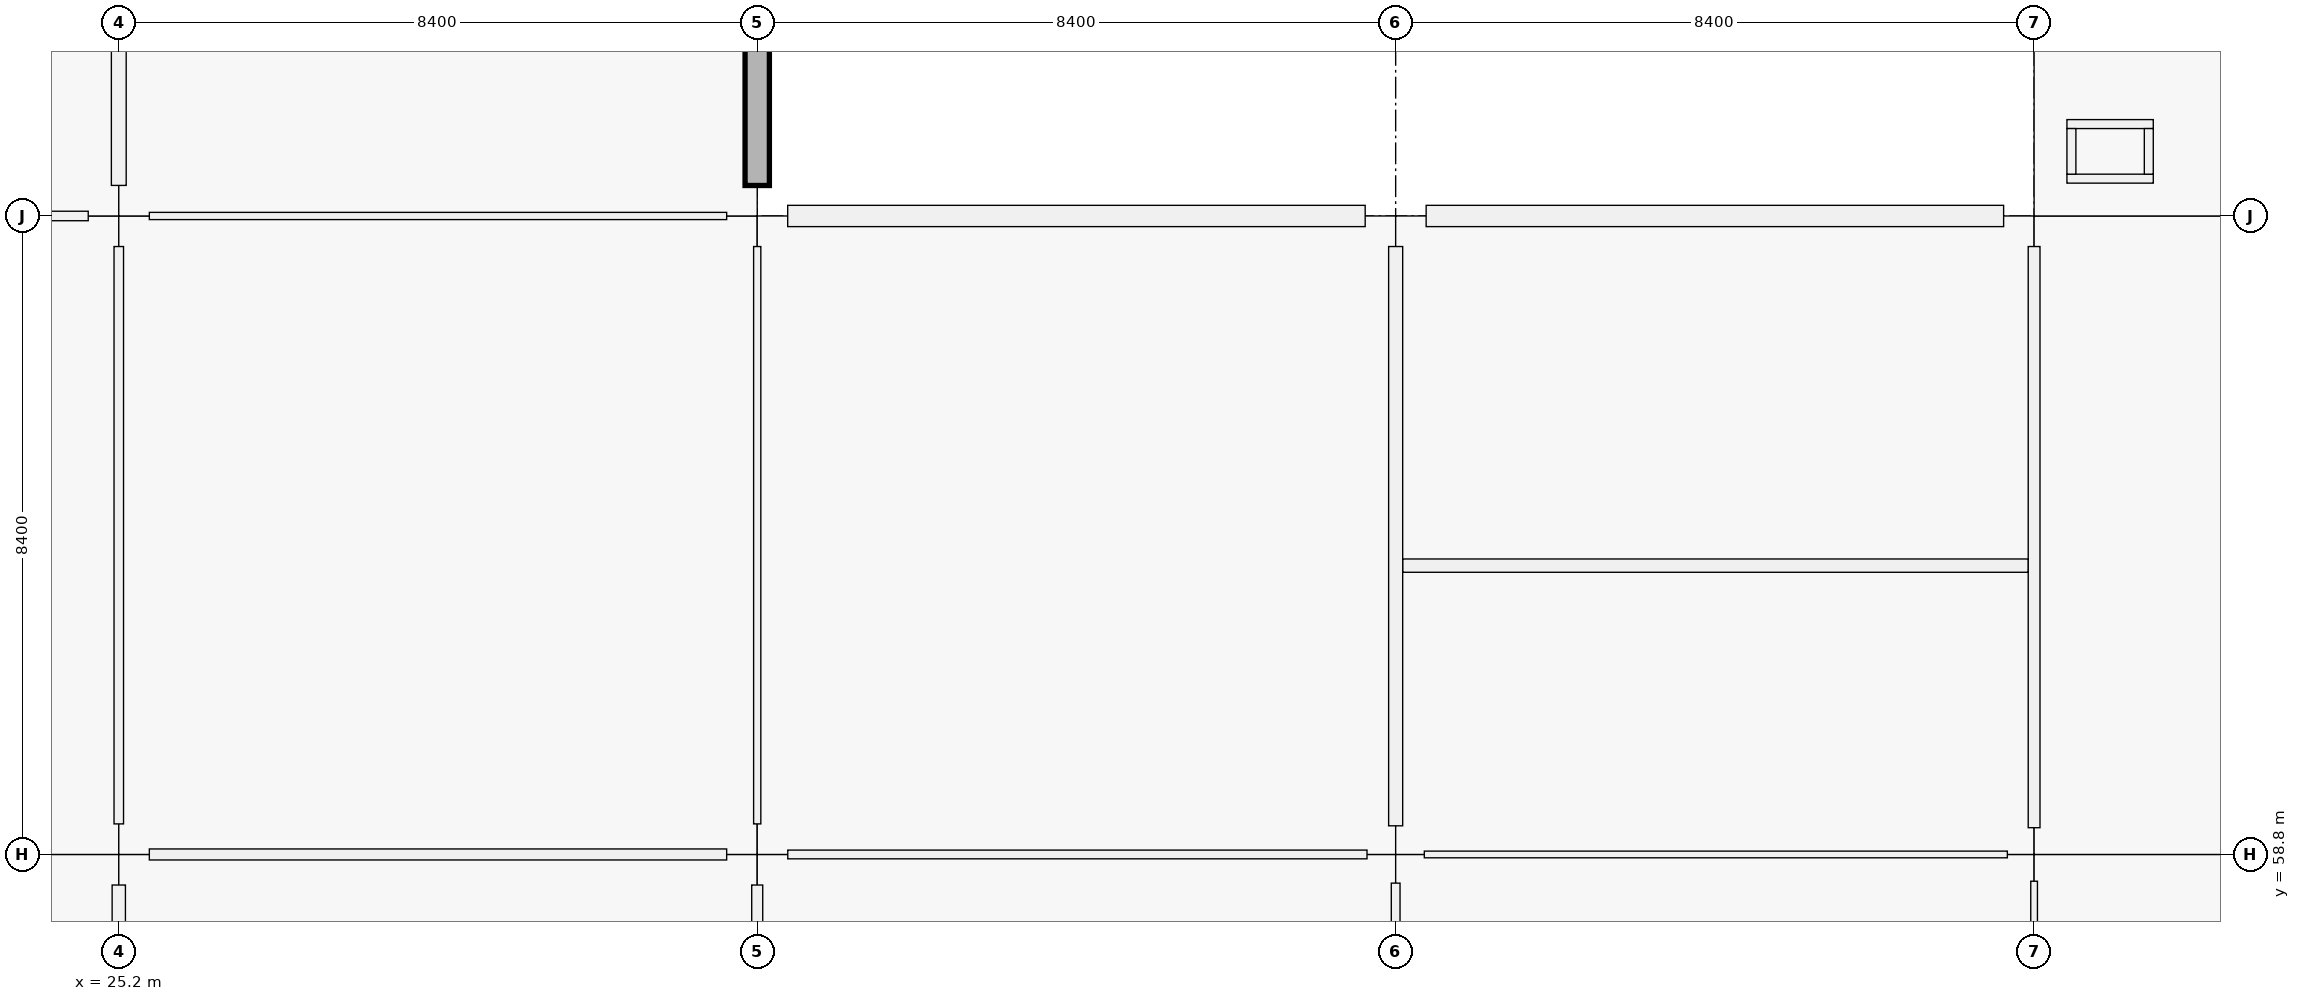
"""IFC4 building model, lengths in metres.
Left out: names, types, materials, properties, quantities, classifications, styles, units other than length and angle.
Written with IfcOpenShell. Run it as: python <this file> out.ifc"""

import sys

from ifc_helpers import new_model, si_unit, direction, frame, frame_2d, origin, origin_2d, place, context, subcontext, project, spatial, rectangle, extrude, element, fill, save


model = new_model("IFC4")
c1 = context("Model", 3, precision=1e-05, world=origin(), true_north=direction((0.0, 1.0)))
c2 = subcontext(c1, "Body", "Model", "MODEL_VIEW")
j1 = project(units=[si_unit("LENGTHUNIT", "METRE"), si_unit("PLANEANGLEUNIT", "RADIAN")], contexts=[c1])
p1 = place(None, origin())
s1 = spatial("IfcSite", under=j1, at=p1, CompositionType="ELEMENT")
p2 = place(p1, origin())
s2 = spatial("IfcBuilding", under=s1, at=p2, CompositionType="ELEMENT")
p3 = place(p2, frame((0.0, 0.0, 5.76)))
s3 = spatial("IfcBuildingStorey", under=s2, at=p3, CompositionType="ELEMENT", Elevation=5.76)
for number, where, z_axis, x_axis in (
    (1, (25.2, 58.8, 0.0), (0.0, 0.0, 1.0), (1.0, 0.0, 0.0)),
    (2, (25.2, 67.2, 0.0), (0.0, 0.0, 1.0), (1.0, 0.0, 0.0)),
    (3, (33.6, 58.8, 0.0), (0.0, 0.0, 1.0), (1.0, 0.0, 0.0)),
    (4, (33.6, 67.2, 0.0), (0.0, 0.0, 1.0), (1.0, 0.0, 0.0)),
):
    element("IfcColumn", number, at=place(p3, frame(where, z_axis=z_axis, x_axis=x_axis)), inside=s3, PredefinedType="COLUMN", context=c2, shape_type="SweptSolid", body=[
        extrude(rectangle(XDim=0.8, YDim=0.8, at=origin_2d()), origin(), (0.0, 0.0, 1.0), 4.5),
    ])
p4 = place(p3, frame((42.0, 58.8, 0.0), z_axis=(0.0, 0.0, 1.0), x_axis=(1.0, 0.0, 0.0)))
e5 = element("IfcColumn", 5, at=p4, inside=s3, PredefinedType="COLUMN", context=c2, shape_type="SweptSolid", body=[
    extrude(rectangle(XDim=0.75, YDim=0.75, at=origin_2d()), origin(), (0.0, 0.0, 1.0), 4.5),
])
p5 = place(p3, frame((42.0, 67.2, 0.0), z_axis=(0.0, 0.0, 1.0), x_axis=(1.0, 0.0, 0.0)))
e6 = element("IfcColumn", 6, at=p5, inside=s3, PredefinedType="COLUMN", context=c2, shape_type="SweptSolid", body=[
    extrude(rectangle(XDim=0.8, YDim=0.8, at=origin_2d()), origin(), (0.0, 0.0, 1.0), 4.5),
])
p6 = place(p3, frame((50.4, 58.8, 0.0), z_axis=(0.0, 0.0, 1.0), x_axis=(1.0, 0.0, 0.0)))
e7 = element("IfcColumn", 7, at=p6, inside=s3, PredefinedType="COLUMN", context=c2, shape_type="SweptSolid", body=[
    extrude(rectangle(XDim=0.7, YDim=0.7, at=origin_2d()), origin(), (0.0, 0.0, 1.0), 4.5),
])
p7 = place(p3, frame((50.4, 67.2, 0.0), z_axis=(0.0, 0.0, 1.0), x_axis=(1.0, 0.0, 0.0)))
e8 = element("IfcColumn", 8, at=p7, inside=s3, PredefinedType="COLUMN", context=c2, shape_type="SweptSolid", body=[
    extrude(rectangle(XDim=0.8, YDim=0.8, at=origin_2d()), origin(), (0.0, 0.0, 1.0), 4.5),
])
p8 = place(p3, frame((33.6, 75.199, 0.0), z_axis=(0.0, 0.0, 1.0), x_axis=(0.0, -1.0, 0.0)))
e9 = element("IfcWall", 9, at=p8, inside=s3, PredefinedType="SOLIDWALL", context=c2, shape_type="SweptSolid", body=[
    extrude(rectangle(XDim=7.598, YDim=0.32, at=frame_2d((3.799, 0.0))), origin(), (0.0, 0.0, 1.0), 3.4),
])
p9 = place(p8, frame((2.524, 0.0, 0.9)))
e10 = element("IfcOpeningElement", 10, at=p9, cuts=e9, PredefinedType="OPENING", context=c2, shape_type="SweptSolid", body=[
    extrude(rectangle(XDim=2.55, YDim=1.95, at=frame_2d((1.275, 0.975))), frame((0.0, 0.16, 0.0), z_axis=(0.0, -1.0, 0.0), x_axis=(1.0, 0.0, 0.0)), (0.0, 0.0, 1.0), 0.32),
])
p10 = place(p3, frame((34.001, 67.2, 0.0), z_axis=(0.0, 0.0, 1.0), x_axis=(1.0, 0.0, 0.0)))
e11 = element("IfcWall", 11, at=p10, inside=s3, PredefinedType="SOLIDWALL", context=c2, shape_type="SweptSolid", body=[
    extrude(rectangle(XDim=7.598, YDim=0.28, at=frame_2d((3.799, 0.0))), origin(), (0.0, 0.0, 1.0), 3.4),
])
p11 = place(p10, frame((3.149, 0.0, 0.9)))
e12 = element("IfcOpeningElement", 12, at=p11, cuts=e11, PredefinedType="OPENING", context=c2, shape_type="SweptSolid", body=[
    extrude(rectangle(XDim=1.3, YDim=1.95, at=frame_2d((0.65, 0.975))), frame((0.0, 0.14, 0.0), z_axis=(0.0, -1.0, 0.0), x_axis=(1.0, 0.0, 0.0)), (0.0, 0.0, 1.0), 0.28),
])
p12 = place(p3, frame((42.401, 67.2, 0.0), z_axis=(0.0, 0.0, 1.0), x_axis=(1.0, 0.0, 0.0)))
e13 = element("IfcWall", 13, at=p12, inside=s3, PredefinedType="SOLIDWALL", context=c2, shape_type="SweptSolid", body=[
    extrude(rectangle(XDim=7.598, YDim=0.28, at=frame_2d((3.799, 0.0))), origin(), (0.0, 0.0, 1.0), 3.4),
])
p13 = place(p12, frame((3.024, 0.0, 0.9)))
e14 = element("IfcOpeningElement", 14, at=p13, cuts=e13, PredefinedType="OPENING", context=c2, shape_type="SweptSolid", body=[
    extrude(rectangle(XDim=1.55, YDim=1.6, at=frame_2d((0.775, 0.8))), frame((0.0, 0.14, 0.0), z_axis=(0.0, -1.0, 0.0), x_axis=(1.0, 0.0, 0.0)), (0.0, 0.0, 1.0), 0.28),
])
for number, where, z_axis, x_axis in (
    (15, (50.832, 67.691, 0.0), (0.0, 0.0, 1.0), (1.0, 0.0, 0.0)),
    (16, (50.832, 68.409, 0.0), (0.0, 0.0, 1.0), (1.0, 0.0, 0.0)),
):
    element("IfcWall", number, at=place(p3, frame(where, z_axis=z_axis, x_axis=x_axis)), inside=s3, PredefinedType="PARTITIONING", context=c2, shape_type="SweptSolid", body=[
        extrude(rectangle(XDim=1.136, YDim=0.118, at=frame_2d((0.568, 0.0))), origin(), (0.0, 0.0, 1.0), 3.48),
    ])
for number, where, z_axis, x_axis in (
    (17, (50.891, 67.75, 0.0), (0.0, 0.0, 1.0), (0.0, 1.0, 0.0)),
    (18, (51.909, 67.75, 0.0), (0.0, 0.0, 1.0), (0.0, 1.0, 0.0)),
):
    element("IfcWall", number, at=place(p3, frame(where, z_axis=z_axis, x_axis=x_axis)), inside=s3, PredefinedType="PARTITIONING", context=c2, shape_type="SweptSolid", body=[
        extrude(rectangle(XDim=0.6, YDim=0.118, at=frame_2d((0.3, 0.0))), origin(), (0.0, 0.0, 1.0), 3.48),
    ])
p14 = place(p3, frame((17.202, 67.2, 0.0), z_axis=(0.0, 0.0, 1.0), x_axis=(1.0, 0.0, 0.0)))
e19 = element("IfcWall", 19, at=p14, inside=s3, PredefinedType="PARTITIONING", context=c2, shape_type="SweptSolid", body=[
    extrude(rectangle(XDim=7.596, YDim=0.125, at=frame_2d((3.798, 0.0))), origin(), (0.0, 0.0, 1.0), 2.4),
])
p15 = place(p14, frame((3.273, 0.0, 0.0)))
e20 = element("IfcOpeningElement", 20, at=p15, cuts=e19, PredefinedType="OPENING", context=c2, shape_type="SweptSolid", body=[
    extrude(rectangle(XDim=1.05, YDim=2.12, at=frame_2d((0.525, 1.06))), frame((0.0, 0.062, 0.0), z_axis=(0.0, -1.0, 0.0), x_axis=(1.0, 0.0, 0.0)), (0.0, 0.0, 1.0), 0.125),
])
p16 = place(p3, frame((25.602, 58.8, 0.0), z_axis=(0.0, 0.0, 1.0), x_axis=(1.0, 0.0, 0.0)))
e21 = element("IfcWall", 21, at=p16, inside=s3, PredefinedType="PARTITIONING", context=c2, shape_type="SweptSolid", body=[
    extrude(rectangle(XDim=7.596, YDim=0.145, at=frame_2d((3.798, 0.0))), origin(), (0.0, 0.0, 1.0), 2.4),
])
p17 = place(p16, frame((3.268, 0.0, 0.0)))
e22 = element("IfcOpeningElement", 22, at=p17, cuts=e21, PredefinedType="OPENING", context=c2, shape_type="SweptSolid", body=[
    extrude(rectangle(XDim=1.06, YDim=2.22, at=frame_2d((0.53, 1.11))), frame((0.0, 0.073, 0.0), z_axis=(0.0, -1.0, 0.0), x_axis=(1.0, 0.0, 0.0)), (0.0, 0.0, 1.0), 0.145),
])
p18 = place(p3, frame((25.602, 67.2, 0.0), z_axis=(0.0, 0.0, 1.0), x_axis=(1.0, 0.0, 0.0)))
e23 = element("IfcWall", 23, at=p18, inside=s3, PredefinedType="PARTITIONING", context=c2, shape_type="SweptSolid", body=[
    extrude(rectangle(XDim=7.596, YDim=0.095, at=frame_2d((3.798, 0.0))), origin(), (0.0, 0.0, 1.0), 2.4),
])
p19 = place(p18, frame((3.258, 0.0, 0.0)))
e24 = element("IfcOpeningElement", 24, at=p19, cuts=e23, PredefinedType="OPENING", context=c2, shape_type="SweptSolid", body=[
    extrude(rectangle(XDim=1.08, YDim=2.22, at=frame_2d((0.54, 1.11))), frame((0.0, 0.047, 0.0), z_axis=(0.0, -1.0, 0.0), x_axis=(1.0, 0.0, 0.0)), (0.0, 0.0, 1.0), 0.095),
])
p20 = place(p3, frame((34.002, 58.8, 0.0), z_axis=(0.0, 0.0, 1.0), x_axis=(1.0, 0.0, 0.0)))
e25 = element("IfcWall", 25, at=p20, inside=s3, PredefinedType="PARTITIONING", context=c2, shape_type="SweptSolid", body=[
    extrude(rectangle(XDim=7.621, YDim=0.115, at=frame_2d((3.811, 0.0))), origin(), (0.0, 0.0, 1.0), 2.4),
])
p21 = place(p20, frame((3.28, 0.0, 0.0)))
e26 = element("IfcOpeningElement", 26, at=p21, cuts=e25, PredefinedType="OPENING", context=c2, shape_type="SweptSolid", body=[
    extrude(rectangle(XDim=1.06, YDim=2.22, at=frame_2d((0.53, 1.11))), frame((0.0, 0.058, 0.0), z_axis=(0.0, -1.0, 0.0), x_axis=(1.0, 0.0, 0.0)), (0.0, 0.0, 1.0), 0.115),
])
p22 = place(p3, frame((42.377, 58.8, 0.0), z_axis=(0.0, 0.0, 1.0), x_axis=(1.0, 0.0, 0.0)))
e27 = element("IfcWall", 27, at=p22, inside=s3, PredefinedType="PARTITIONING", context=c2, shape_type="SweptSolid", body=[
    extrude(rectangle(XDim=7.671, YDim=0.088, at=frame_2d((3.835, 0.0))), origin(), (0.0, 0.0, 1.0), 2.4),
])
p23 = place(p3, frame((25.2, 50.802, 0.0), z_axis=(0.0, 0.0, 1.0), x_axis=(0.0, 1.0, 0.0)))
e28 = element("IfcWall", 28, at=p23, inside=s3, PredefinedType="PARTITIONING", context=c2, shape_type="SweptSolid", body=[
    extrude(rectangle(XDim=7.596, YDim=0.175, at=frame_2d((3.798, 0.0))), origin(), (0.0, 0.0, 1.0), 2.4),
])
p24 = place(p23, frame((3.288, 0.0, 0.0)))
e29 = element("IfcOpeningElement", 29, at=p24, cuts=e28, PredefinedType="OPENING", context=c2, shape_type="SweptSolid", body=[
    extrude(rectangle(XDim=1.02, YDim=2.2, at=frame_2d((0.51, 1.1))), frame((0.0, 0.087, 0.0), z_axis=(0.0, -1.0, 0.0), x_axis=(1.0, 0.0, 0.0)), (0.0, 0.0, 1.0), 0.175),
])
p25 = place(p3, frame((25.2, 59.202, 0.0), z_axis=(0.0, 0.0, 1.0), x_axis=(0.0, 1.0, 0.0)))
e30 = element("IfcWall", 30, at=p25, inside=s3, PredefinedType="PARTITIONING", context=c2, shape_type="SweptSolid", body=[
    extrude(rectangle(XDim=7.596, YDim=0.125, at=frame_2d((3.798, 0.0))), origin(), (0.0, 0.0, 1.0), 2.4),
])
p26 = place(p25, frame((3.298, 0.0, 0.0)))
e31 = element("IfcOpeningElement", 31, at=p26, cuts=e30, PredefinedType="OPENING", context=c2, shape_type="SweptSolid", body=[
    extrude(rectangle(XDim=1.0, YDim=2.2, at=frame_2d((0.5, 1.1))), frame((0.0, 0.062, 0.0), z_axis=(0.0, -1.0, 0.0), x_axis=(1.0, 0.0, 0.0)), (0.0, 0.0, 1.0), 0.125),
])
p27 = place(p3, frame((25.2, 67.602, 0.0), z_axis=(0.0, 0.0, 1.0), x_axis=(0.0, 1.0, 0.0)))
e32 = element("IfcWall", 32, at=p27, inside=s3, PredefinedType="PARTITIONING", context=c2, shape_type="SweptSolid", body=[
    extrude(rectangle(XDim=7.596, YDim=0.195, at=frame_2d((3.798, 0.0))), origin(), (0.0, 0.0, 1.0), 2.4),
])
p28 = place(p27, frame((3.288, 0.0, 0.0)))
e33 = element("IfcOpeningElement", 33, at=p28, cuts=e32, PredefinedType="OPENING", context=c2, shape_type="SweptSolid", body=[
    extrude(rectangle(XDim=1.02, YDim=2.2, at=frame_2d((0.51, 1.1))), frame((0.0, 0.098, 0.0), z_axis=(0.0, -1.0, 0.0), x_axis=(1.0, 0.0, 0.0)), (0.0, 0.0, 1.0), 0.195),
])
p29 = place(p3, frame((33.6, 50.802, 0.0), z_axis=(0.0, 0.0, 1.0), x_axis=(0.0, 1.0, 0.0)))
e34 = element("IfcWall", 34, at=p29, inside=s3, PredefinedType="PARTITIONING", context=c2, shape_type="SweptSolid", body=[
    extrude(rectangle(XDim=7.596, YDim=0.145, at=frame_2d((3.798, 0.0))), origin(), (0.0, 0.0, 1.0), 2.4),
])
p30 = place(p29, frame((3.318, 0.0, 0.0)))
e35 = element("IfcOpeningElement", 35, at=p30, cuts=e34, PredefinedType="OPENING", context=c2, shape_type="SweptSolid", body=[
    extrude(rectangle(XDim=0.96, YDim=2.18, at=frame_2d((0.48, 1.09))), frame((0.0, 0.073, 0.0), z_axis=(0.0, -1.0, 0.0), x_axis=(1.0, 0.0, 0.0)), (0.0, 0.0, 1.0), 0.145),
])
p31 = place(p3, frame((33.6, 59.202, 0.0), z_axis=(0.0, 0.0, 1.0), x_axis=(0.0, 1.0, 0.0)))
e36 = element("IfcWall", 36, at=p31, inside=s3, PredefinedType="PARTITIONING", context=c2, shape_type="SweptSolid", body=[
    extrude(rectangle(XDim=7.596, YDim=0.095, at=frame_2d((3.798, 0.0))), origin(), (0.0, 0.0, 1.0), 2.4),
])
p32 = place(p31, frame((3.308, 0.0, 0.0)))
e37 = element("IfcOpeningElement", 37, at=p32, cuts=e36, PredefinedType="OPENING", context=c2, shape_type="SweptSolid", body=[
    extrude(rectangle(XDim=0.98, YDim=2.18, at=frame_2d((0.49, 1.09))), frame((0.0, 0.047, 0.0), z_axis=(0.0, -1.0, 0.0), x_axis=(1.0, 0.0, 0.0)), (0.0, 0.0, 1.0), 0.095),
])
p33 = place(p3, frame((42.0, 50.752, 0.0), z_axis=(0.0, 0.0, 1.0), x_axis=(0.0, 1.0, 0.0)))
e38 = element("IfcWall", 38, at=p33, inside=s3, PredefinedType="PARTITIONING", context=c2, shape_type="SweptSolid", body=[
    extrude(rectangle(XDim=7.671, YDim=0.115, at=frame_2d((3.835, 0.0))), origin(), (0.0, 0.0, 1.0), 2.4),
])
p34 = place(p3, frame((42.0, 59.177, 0.0), z_axis=(0.0, 0.0, 1.0), x_axis=(0.0, 1.0, 0.0)))
e39 = element("IfcWall", 39, at=p34, inside=s3, PredefinedType="PARTITIONING", context=c2, shape_type="SweptSolid", body=[
    extrude(rectangle(XDim=7.621, YDim=0.185, at=frame_2d((3.811, 0.0))), origin(), (0.0, 0.0, 1.0), 2.4),
])
p35 = place(p3, frame((50.4, 50.777, 0.0), z_axis=(0.0, 0.0, 1.0), x_axis=(0.0, 1.0, 0.0)))
e40 = element("IfcWall", 40, at=p35, inside=s3, PredefinedType="PARTITIONING", context=c2, shape_type="SweptSolid", body=[
    extrude(rectangle(XDim=7.671, YDim=0.088, at=frame_2d((3.835, 0.0))), origin(), (0.0, 0.0, 1.0), 2.4),
])
p36 = place(p35, frame((1.193, 0.0, 0.0)))
e41 = element("IfcOpeningElement", 41, at=p36, cuts=e40, PredefinedType="OPENING", context=c2, shape_type="SweptSolid", body=[
    extrude(rectangle(XDim=0.94, YDim=2.15, at=frame_2d((0.47, 1.075))), frame((0.0, 0.044, 0.0), z_axis=(0.0, -1.0, 0.0), x_axis=(1.0, 0.0, 0.0)), (0.0, 0.0, 1.0), 0.088),
])
p37 = place(p35, frame((5.123, 0.0, 0.0)))
e42 = element("IfcOpeningElement", 42, at=p37, cuts=e40, PredefinedType="OPENING", context=c2, shape_type="SweptSolid", body=[
    extrude(rectangle(XDim=0.92, YDim=2.15, at=frame_2d((0.46, 1.075))), frame((0.0, 0.044, 0.0), z_axis=(0.0, -1.0, 0.0), x_axis=(1.0, 0.0, 0.0)), (0.0, 0.0, 1.0), 0.088),
])
p38 = place(p3, frame((50.4, 59.152, 0.0), z_axis=(0.0, 0.0, 1.0), x_axis=(0.0, 1.0, 0.0)))
e43 = element("IfcWall", 43, at=p38, inside=s3, PredefinedType="PARTITIONING", context=c2, shape_type="SweptSolid", body=[
    extrude(rectangle(XDim=7.646, YDim=0.155, at=frame_2d((3.823, 0.0))), origin(), (0.0, 0.0, 1.0), 2.4),
])
p39 = place(p38, frame((1.163, 0.0, 0.0)))
e44 = element("IfcOpeningElement", 44, at=p39, cuts=e43, PredefinedType="OPENING", context=c2, shape_type="SweptSolid", body=[
    extrude(rectangle(XDim=1.05, YDim=2.12, at=frame_2d((0.525, 1.06))), frame((0.0, 0.078, 0.0), z_axis=(0.0, -1.0, 0.0), x_axis=(1.0, 0.0, 0.0)), (0.0, 0.0, 1.0), 0.155),
])
p40 = place(p38, frame((5.103, 0.0, 0.0)))
e45 = element("IfcOpeningElement", 45, at=p40, cuts=e43, PredefinedType="OPENING", context=c2, shape_type="SweptSolid", body=[
    extrude(rectangle(XDim=1.01, YDim=2.12, at=frame_2d((0.505, 1.06))), frame((0.0, 0.078, 0.0), z_axis=(0.0, -1.0, 0.0), x_axis=(1.0, 0.0, 0.0)), (0.0, 0.0, 1.0), 0.155),
])
p41 = place(p3, frame((42.094, 62.6, 0.0), z_axis=(0.0, 0.0, 1.0), x_axis=(1.0, 0.0, 0.0)))
e46 = element("IfcWall", 46, at=p41, inside=s3, PredefinedType="PARTITIONING", context=c2, shape_type="SweptSolid", body=[
    extrude(rectangle(XDim=8.226, YDim=0.175, at=frame_2d((4.113, 0.0))), origin(), (0.0, 0.0, 1.0), 2.4),
])
p42 = place(p11, origin())
e47 = element("IfcWindow", 47, at=p42, inside=s3, PartitioningType="SINGLE_PANEL", PredefinedType="WINDOW", context=c2, shape_type="SweptSolid", body=[
    extrude(rectangle(XDim=1.3, YDim=1.95, at=frame_2d((0.65, 0.975))), frame((0.0, 0.03, 0.0), z_axis=(0.0, -1.0, 0.0), x_axis=(1.0, 0.0, 0.0)), (0.0, 0.0, 1.0), 0.06),
])
fill(e12, e47)
p43 = place(p13, origin())
e48 = element("IfcWindow", 48, at=p43, inside=s3, PartitioningType="SINGLE_PANEL", PredefinedType="WINDOW", context=c2, shape_type="SweptSolid", body=[
    extrude(rectangle(XDim=1.55, YDim=1.6, at=frame_2d((0.775, 0.8))), frame((0.0, 0.03, 0.0), z_axis=(0.0, -1.0, 0.0), x_axis=(1.0, 0.0, 0.0)), (0.0, 0.0, 1.0), 0.06),
])
fill(e14, e48)
p44 = place(p39, origin())
e49 = element("IfcDoor", 49, at=p44, inside=s3, OperationType="SINGLE_SWING_RIGHT", PredefinedType="DOOR", context=c2, shape_type="SweptSolid", body=[
    extrude(rectangle(XDim=1.05, YDim=2.12, at=frame_2d((0.525, 1.06))), frame((0.0, 0.025, 0.0), z_axis=(0.0, -1.0, 0.0), x_axis=(1.0, 0.0, 0.0)), (0.0, 0.0, 1.0), 0.05),
])
fill(e44, e49)
p45 = place(p40, origin())
e50 = element("IfcDoor", 50, at=p45, inside=s3, OperationType="SINGLE_SWING_LEFT", PredefinedType="DOOR", context=c2, shape_type="SweptSolid", body=[
    extrude(rectangle(XDim=1.01, YDim=2.12, at=frame_2d((0.505, 1.06))), frame((0.0, 0.025, 0.0), z_axis=(0.0, -1.0, 0.0), x_axis=(1.0, 0.0, 0.0)), (0.0, 0.0, 1.0), 0.05),
])
fill(e45, e50)
p46 = place(p26, origin())
e51 = element("IfcDoor", 51, at=p46, inside=s3, OperationType="SINGLE_SWING_RIGHT", PredefinedType="DOOR", context=c2, shape_type="SweptSolid", body=[
    extrude(rectangle(XDim=1.0, YDim=2.2, at=frame_2d((0.5, 1.1))), frame((0.0, 0.025, 0.0), z_axis=(0.0, -1.0, 0.0), x_axis=(1.0, 0.0, 0.0)), (0.0, 0.0, 1.0), 0.05),
])
fill(e31, e51)
p47 = place(p19, origin())
e52 = element("IfcDoor", 52, at=p47, inside=s3, OperationType="SINGLE_SWING_RIGHT", PredefinedType="DOOR", context=c2, shape_type="SweptSolid", body=[
    extrude(rectangle(XDim=1.08, YDim=2.22, at=frame_2d((0.54, 1.11))), frame((0.0, 0.025, 0.0), z_axis=(0.0, -1.0, 0.0), x_axis=(1.0, 0.0, 0.0)), (0.0, 0.0, 1.0), 0.05),
])
fill(e24, e52)
p48 = place(p21, origin())
e53 = element("IfcDoor", 53, at=p48, inside=s3, OperationType="SINGLE_SWING_LEFT", PredefinedType="DOOR", context=c2, shape_type="SweptSolid", body=[
    extrude(rectangle(XDim=1.06, YDim=2.22, at=frame_2d((0.53, 1.11))), frame((0.0, 0.025, 0.0), z_axis=(0.0, -1.0, 0.0), x_axis=(1.0, 0.0, 0.0)), (0.0, 0.0, 1.0), 0.05),
])
fill(e26, e53)
p49 = place(p17, origin())
e54 = element("IfcDoor", 54, at=p49, inside=s3, OperationType="SINGLE_SWING_RIGHT", PredefinedType="DOOR", context=c2, shape_type="SweptSolid", body=[
    extrude(rectangle(XDim=1.06, YDim=2.22, at=frame_2d((0.53, 1.11))), frame((0.0, 0.025, 0.0), z_axis=(0.0, -1.0, 0.0), x_axis=(1.0, 0.0, 0.0)), (0.0, 0.0, 1.0), 0.05),
])
fill(e22, e54)
p50 = place(p32, origin())
e55 = element("IfcDoor", 55, at=p50, inside=s3, OperationType="SINGLE_SWING_LEFT", PredefinedType="DOOR", context=c2, shape_type="SweptSolid", body=[
    extrude(rectangle(XDim=0.98, YDim=2.18, at=frame_2d((0.49, 1.09))), frame((0.0, 0.025, 0.0), z_axis=(0.0, -1.0, 0.0), x_axis=(1.0, 0.0, 0.0)), (0.0, 0.0, 1.0), 0.05),
])
fill(e37, e55)
save(model, sys.argv[1])
